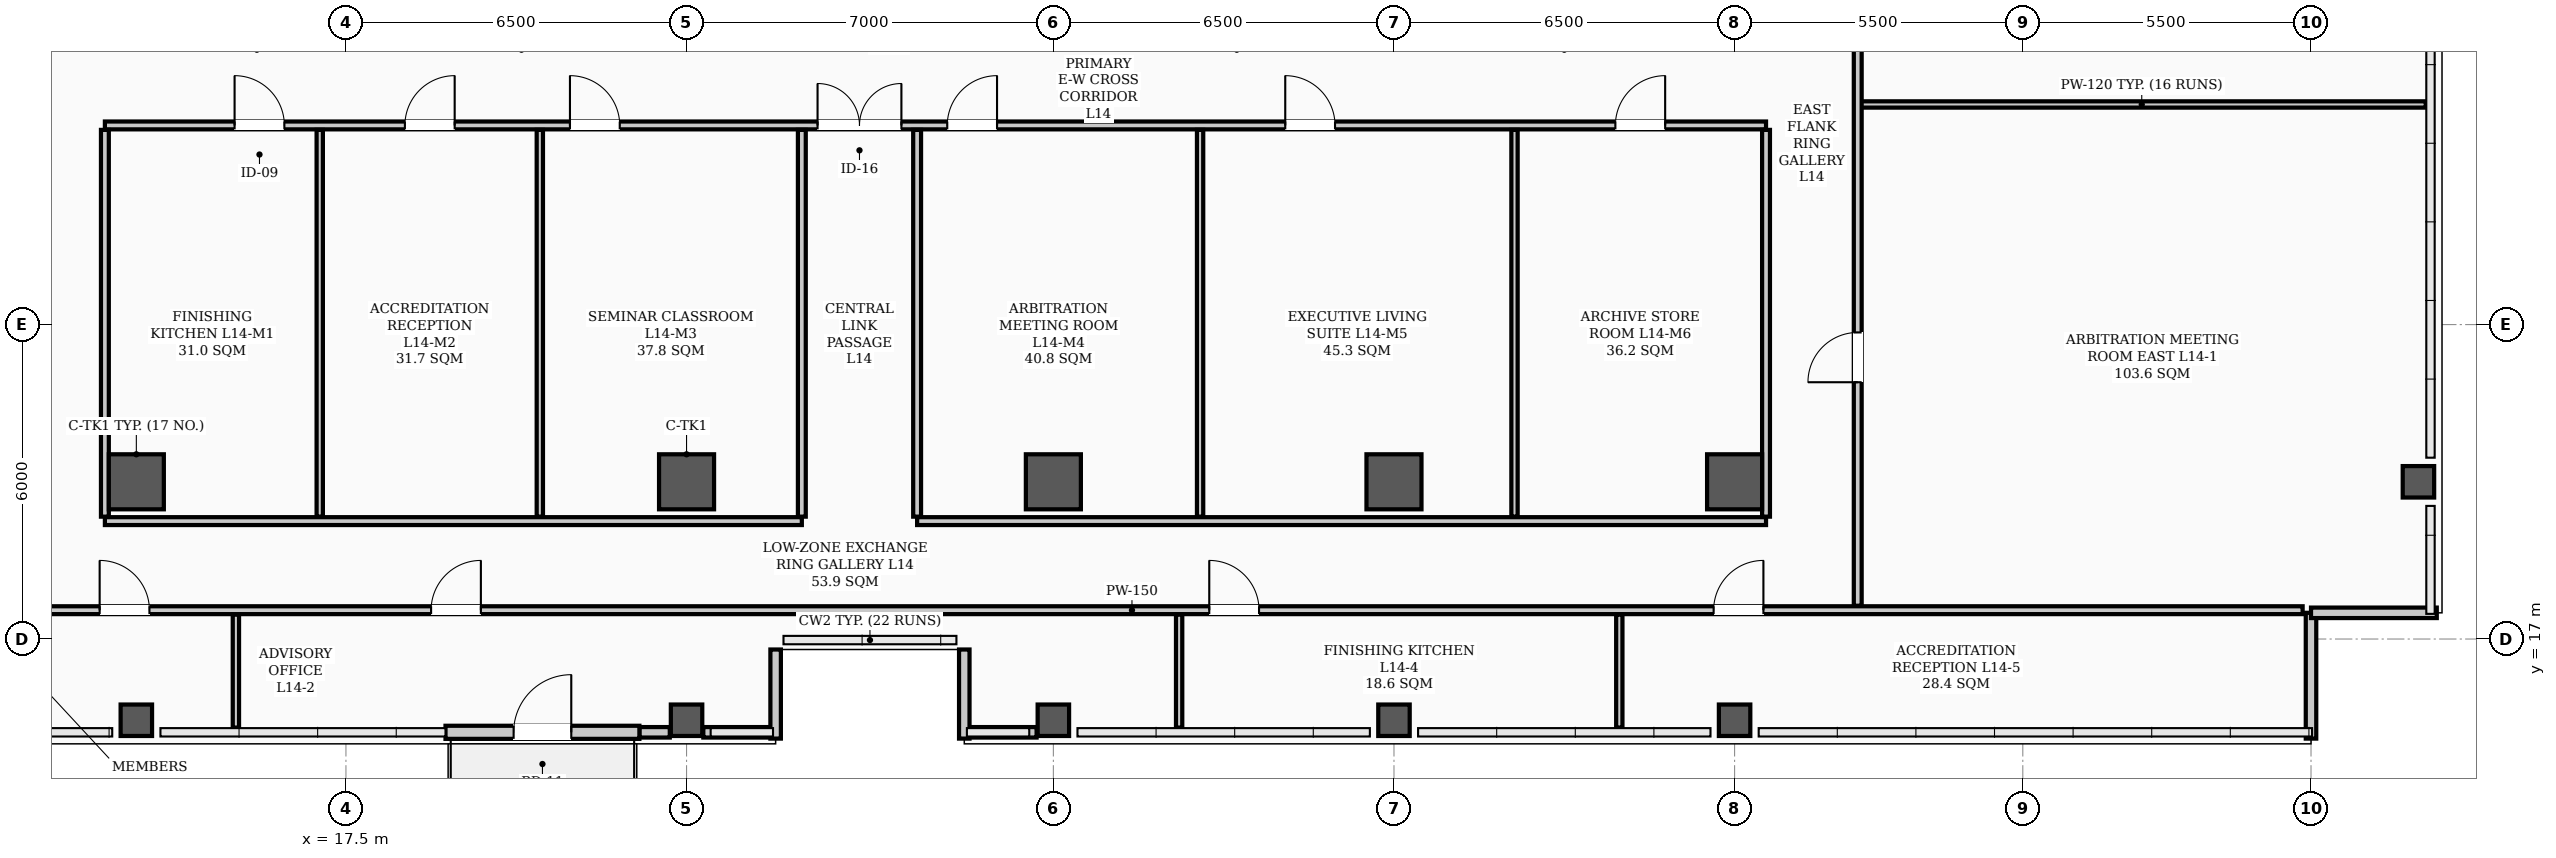
"""IFC4 building model, lengths in metres.
Left out: names, types, materials, properties, quantities, classifications, styles, units other than length and angle.
Written with IfcOpenShell. Run it as: python <this file> out.ifc"""

import sys

from ifc_helpers import new_model, si_unit, direction, frame, frame_2d, origin, origin_2d, place, context, subcontext, project, spatial, rectangle, hollow_rectangle, extrude, element, fill, save


model = new_model("IFC4")
c1 = context("Model", 3, precision=1e-05, world=origin(), true_north=direction((0.0, 1.0)))
c2 = subcontext(c1, "Body", "Model", "MODEL_VIEW")
j1 = project(units=[si_unit("LENGTHUNIT", "METRE"), si_unit("PLANEANGLEUNIT", "RADIAN")], contexts=[c1])
p1 = place(None, origin())
s1 = spatial("IfcSite", under=j1, at=p1, CompositionType="ELEMENT")
p2 = place(p1, origin())
s2 = spatial("IfcBuilding", under=s1, at=p2, CompositionType="ELEMENT")
p3 = place(p2, frame((0.0, 0.0, 57.7)))
s3 = spatial("IfcBuildingStorey", under=s2, at=p3, CompositionType="ELEMENT", Elevation=57.7)
for number, where, z_axis, x_axis in (
    (1, (13.5, 20.0, 0.0), (0.0, 0.0, 1.0), (1.0, 0.0, 0.0)),
    (2, (24.0, 20.0, 0.0), (0.0, 0.0, 1.0), (1.0, 0.0, 0.0)),
    (3, (31.0, 20.0, 0.0), (0.0, 0.0, 1.0), (1.0, 0.0, 0.0)),
    (4, (37.5, 20.0, 0.0), (0.0, 0.0, 1.0), (1.0, 0.0, 0.0)),
    (5, (44.0, 20.0, 0.0), (0.0, 0.0, 1.0), (1.0, 0.0, 0.0)),
):
    element("IfcColumn", number, at=place(p3, frame(where, z_axis=z_axis, x_axis=x_axis)), inside=s3, PredefinedType="COLUMN", context=c2, shape_type="SweptSolid", body=[
        extrude(hollow_rectangle(XDim=1.05, YDim=1.05, WallThickness=0.038, InnerFilletRadius=0.019, OuterFilletRadius=0.057, at=origin_2d()), origin(), (0.0, 0.0, 1.0), 3.9),
    ])
for number, where, z_axis, x_axis in (
    (6, (13.5, 15.45, 0.0), (0.0, 0.0, 1.0), (1.0, 0.0, 0.0)),
    (7, (24.0, 15.45, 0.0), (0.0, 0.0, 1.0), (1.0, 0.0, 0.0)),
    (8, (31.0, 15.45, 0.0), (0.0, 0.0, 1.0), (1.0, 0.0, 0.0)),
    (9, (37.5, 15.45, 0.0), (0.0, 0.0, 1.0), (1.0, 0.0, 0.0)),
    (10, (44.0, 15.45, 0.0), (0.0, 0.0, 1.0), (1.0, 0.0, 0.0)),
    (11, (57.05, 20.0, 0.0), (0.0, 0.0, 1.0), (1.0, 0.0, 0.0)),
):
    element("IfcColumn", number, at=place(p3, frame(where, z_axis=z_axis, x_axis=x_axis)), inside=s3, PredefinedType="COLUMN", context=c2, shape_type="SweptSolid", body=[
        extrude(hollow_rectangle(XDim=0.6, YDim=0.6, WallThickness=0.026, InnerFilletRadius=0.013, OuterFilletRadius=0.039, at=origin_2d()), origin(), (0.0, 0.0, 1.0), 3.9),
    ])
p4 = place(p3, frame((23.1, 15.22, 0.0), z_axis=(0.0, 0.0, 1.0), x_axis=(1.0, 0.0, 0.0)))
e12 = element("IfcWall", 12, at=p4, inside=s3, PredefinedType="PARAPET", context=c2, shape_type="SweptSolid", body=[
    extrude(rectangle(XDim=0.58, YDim=0.2, at=frame_2d((0.29, 0.0))), origin(), (0.0, 0.0, 1.0), 1.2),
])
for number, where, z_axis, x_axis in (
    (13, (24.32, 15.22, 0.0), (0.0, 0.0, 1.0), (1.0, 0.0, 0.0)),
    (14, (29.35, 15.22, 0.0), (0.0, 0.0, 1.0), (1.0, 0.0, 0.0)),
):
    element("IfcWall", number, at=place(p3, frame(where, z_axis=z_axis, x_axis=x_axis)), inside=s3, PredefinedType="PARAPET", context=c2, shape_type="SweptSolid", body=[
        extrude(rectangle(XDim=1.33, YDim=0.2, at=frame_2d((0.665, 0.0))), origin(), (0.0, 0.0, 1.0), 1.2),
    ])
for number, where, z_axis, x_axis in (
    (15, (55.0, 15.1, 0.0), (0.0, 0.0, 1.0), (0.0, 1.0, 0.0)),
    (16, (55.0, 17.5, 0.0), (0.0, 0.0, 1.0), (1.0, 0.0, 0.0)),
):
    element("IfcWall", number, at=place(p3, frame(where, z_axis=z_axis, x_axis=x_axis)), inside=s3, PredefinedType="PARAPET", context=c2, shape_type="SweptSolid", body=[
        extrude(rectangle(XDim=2.4, YDim=0.2, at=frame_2d((1.2, 0.0))), origin(), (0.0, 0.0, 1.0), 1.2),
    ])
for number, where, z_axis, x_axis in (
    (17, (25.7, 15.1, 0.0), (0.0, 0.0, 1.0), (0.0, 1.0, 0.0)),
    (18, (29.3, 16.8, 0.0), (0.0, 0.0, 1.0), (0.0, -1.0, 0.0)),
):
    element("IfcWall", number, at=place(p3, frame(where, z_axis=z_axis, x_axis=x_axis)), inside=s3, PredefinedType="PARAPET", context=c2, shape_type="SweptSolid", body=[
        extrude(rectangle(XDim=1.7, YDim=0.2, at=frame_2d((0.85, 0.0))), origin(), (0.0, 0.0, 1.0), 1.2),
    ])
p5 = place(p3, frame((19.4, 15.22, 0.0), z_axis=(0.0, 0.0, 1.0), x_axis=(1.0, 0.0, 0.0)))
e19 = element("IfcWall", 19, at=p5, inside=s3, PredefinedType="STANDARD", context=c2, shape_type="SweptSolid", body=[
    extrude(rectangle(XDim=3.7, YDim=0.25, at=frame_2d((1.85, 0.0))), origin(), (0.0, 0.0, 1.0), 3.18),
])
p6 = place(p5, frame((1.3, 0.0, 0.0)))
e20 = element("IfcOpeningElement", 20, at=p6, cuts=e19, PredefinedType="OPENING", context=c2, shape_type="SweptSolid", body=[
    extrude(rectangle(XDim=1.1, YDim=2.2, at=frame_2d((0.55, 1.1))), frame((0.0, 0.135, 0.0), z_axis=(0.0, -1.0, 0.0), x_axis=(1.0, 0.0, 0.0)), (0.0, 0.0, 1.0), 0.27),
])
p7 = place(p3, frame((12.9, 26.8, 0.0), z_axis=(0.0, 0.0, 1.0), x_axis=(1.0, 0.0, 0.0)))
e21 = element("IfcWall", 21, at=p7, inside=s3, PredefinedType="PARTITIONING", context=c2, shape_type="SweptSolid", body=[
    extrude(rectangle(XDim=31.7, YDim=0.15, at=frame_2d((15.85, 0.0))), origin(), (0.0, 0.0, 1.0), 3.1),
])
p8 = place(p7, frame((13.6, 0.0, 0.0)))
e22 = element("IfcOpeningElement", 22, at=p8, cuts=e21, PredefinedType="OPENING", context=c2, shape_type="SweptSolid", body=[
    extrude(rectangle(XDim=1.6, YDim=2.08, at=frame_2d((0.8, 1.04))), frame((0.0, 0.085, 0.0), z_axis=(0.0, -1.0, 0.0), x_axis=(1.0, 0.0, 0.0)), (0.0, 0.0, 1.0), 0.17),
])
p9 = place(p7, frame((2.475, 0.0, 0.0)))
e23 = element("IfcOpeningElement", 23, at=p9, cuts=e21, PredefinedType="OPENING", context=c2, shape_type="SweptSolid", body=[
    extrude(rectangle(XDim=0.95, YDim=2.08, at=frame_2d((0.475, 1.04))), frame((0.0, 0.085, 0.0), z_axis=(0.0, -1.0, 0.0), x_axis=(1.0, 0.0, 0.0)), (0.0, 0.0, 1.0), 0.17),
])
p10 = place(p7, frame((5.725, 0.0, 0.0)))
e24 = element("IfcOpeningElement", 24, at=p10, cuts=e21, PredefinedType="OPENING", context=c2, shape_type="SweptSolid", body=[
    extrude(rectangle(XDim=0.95, YDim=2.08, at=frame_2d((0.475, 1.04))), frame((0.0, 0.085, 0.0), z_axis=(0.0, -1.0, 0.0), x_axis=(1.0, 0.0, 0.0)), (0.0, 0.0, 1.0), 0.17),
])
p11 = place(p7, frame((8.875, 0.0, 0.0)))
e25 = element("IfcOpeningElement", 25, at=p11, cuts=e21, PredefinedType="OPENING", context=c2, shape_type="SweptSolid", body=[
    extrude(rectangle(XDim=0.95, YDim=2.08, at=frame_2d((0.475, 1.04))), frame((0.0, 0.085, 0.0), z_axis=(0.0, -1.0, 0.0), x_axis=(1.0, 0.0, 0.0)), (0.0, 0.0, 1.0), 0.17),
])
p12 = place(p7, frame((16.075, 0.0, 0.0)))
e26 = element("IfcOpeningElement", 26, at=p12, cuts=e21, PredefinedType="OPENING", context=c2, shape_type="SweptSolid", body=[
    extrude(rectangle(XDim=0.95, YDim=2.08, at=frame_2d((0.475, 1.04))), frame((0.0, 0.085, 0.0), z_axis=(0.0, -1.0, 0.0), x_axis=(1.0, 0.0, 0.0)), (0.0, 0.0, 1.0), 0.17),
])
p13 = place(p7, frame((22.525, 0.0, 0.0)))
e27 = element("IfcOpeningElement", 27, at=p13, cuts=e21, PredefinedType="OPENING", context=c2, shape_type="SweptSolid", body=[
    extrude(rectangle(XDim=0.95, YDim=2.08, at=frame_2d((0.475, 1.04))), frame((0.0, 0.085, 0.0), z_axis=(0.0, -1.0, 0.0), x_axis=(1.0, 0.0, 0.0)), (0.0, 0.0, 1.0), 0.17),
])
p14 = place(p7, frame((28.825, 0.0, 0.0)))
e28 = element("IfcOpeningElement", 28, at=p14, cuts=e21, PredefinedType="OPENING", context=c2, shape_type="SweptSolid", body=[
    extrude(rectangle(XDim=0.95, YDim=2.08, at=frame_2d((0.475, 1.04))), frame((0.0, 0.085, 0.0), z_axis=(0.0, -1.0, 0.0), x_axis=(1.0, 0.0, 0.0)), (0.0, 0.0, 1.0), 0.17),
])
p15 = place(p3, frame((10.16, 17.55, 0.0), z_axis=(0.0, 0.0, 1.0), x_axis=(1.0, 0.0, 0.0)))
e29 = element("IfcWall", 29, at=p15, inside=s3, PredefinedType="PARTITIONING", context=c2, shape_type="SweptSolid", body=[
    extrude(rectangle(XDim=44.68, YDim=0.15, at=frame_2d((22.34, 0.0))), origin(), (0.0, 0.0, 1.0), 3.1),
])
p16 = place(p15, frame((2.64, 0.0, 0.0)))
e30 = element("IfcOpeningElement", 30, at=p16, cuts=e29, PredefinedType="OPENING", context=c2, shape_type="SweptSolid", body=[
    extrude(rectangle(XDim=0.95, YDim=2.08, at=frame_2d((0.475, 1.04))), frame((0.0, 0.085, 0.0), z_axis=(0.0, -1.0, 0.0), x_axis=(1.0, 0.0, 0.0)), (0.0, 0.0, 1.0), 0.17),
])
p17 = place(p15, frame((8.965, 0.0, 0.0)))
e31 = element("IfcOpeningElement", 31, at=p17, cuts=e29, PredefinedType="OPENING", context=c2, shape_type="SweptSolid", body=[
    extrude(rectangle(XDim=0.95, YDim=2.08, at=frame_2d((0.475, 1.04))), frame((0.0, 0.085, 0.0), z_axis=(0.0, -1.0, 0.0), x_axis=(1.0, 0.0, 0.0)), (0.0, 0.0, 1.0), 0.17),
])
p18 = place(p15, frame((23.815, 0.0, 0.0)))
e32 = element("IfcOpeningElement", 32, at=p18, cuts=e29, PredefinedType="OPENING", context=c2, shape_type="SweptSolid", body=[
    extrude(rectangle(XDim=0.95, YDim=2.08, at=frame_2d((0.475, 1.04))), frame((0.0, 0.085, 0.0), z_axis=(0.0, -1.0, 0.0), x_axis=(1.0, 0.0, 0.0)), (0.0, 0.0, 1.0), 0.17),
])
p19 = place(p15, frame((33.44, 0.0, 0.0)))
e33 = element("IfcOpeningElement", 33, at=p19, cuts=e29, PredefinedType="OPENING", context=c2, shape_type="SweptSolid", body=[
    extrude(rectangle(XDim=0.95, YDim=2.08, at=frame_2d((0.475, 1.04))), frame((0.0, 0.085, 0.0), z_axis=(0.0, -1.0, 0.0), x_axis=(1.0, 0.0, 0.0)), (0.0, 0.0, 1.0), 0.17),
])
p20 = place(p3, frame((12.9, 19.25, 0.0), z_axis=(0.0, 0.0, 1.0), x_axis=(1.0, 0.0, 0.0)))
e34 = element("IfcWall", 34, at=p20, inside=s3, PredefinedType="PARTITIONING", context=c2, shape_type="SweptSolid", body=[
    extrude(rectangle(XDim=13.3, YDim=0.15, at=frame_2d((6.65, 0.0))), origin(), (0.0, 0.0, 1.0), 3.1),
])
p21 = place(p3, frame((28.4, 19.25, 0.0), z_axis=(0.0, 0.0, 1.0), x_axis=(1.0, 0.0, 0.0)))
e35 = element("IfcWall", 35, at=p21, inside=s3, PredefinedType="PARTITIONING", context=c2, shape_type="SweptSolid", body=[
    extrude(rectangle(XDim=16.2, YDim=0.15, at=frame_2d((8.1, 0.0))), origin(), (0.0, 0.0, 1.0), 3.1),
])
p22 = place(p3, frame((46.35, 27.2, 0.0), z_axis=(0.0, 0.0, 1.0), x_axis=(1.0, 0.0, 0.0)))
e36 = element("IfcWall", 36, at=p22, inside=s3, PredefinedType="PARTITIONING", context=c2, shape_type="SweptSolid", body=[
    extrude(rectangle(XDim=10.84, YDim=0.12, at=frame_2d((5.42, 0.0))), origin(), (0.0, 0.0, 1.0), 3.212),
])
for number, where, z_axis, x_axis in (
    (37, (26.2, 19.335, 0.0), (0.0, 0.0, 1.0), (0.0, 1.0, 0.0)),
    (38, (28.4, 19.335, 0.0), (0.0, 0.0, 1.0), (0.0, 1.0, 0.0)),
    (39, (12.9, 19.335, 0.0), (0.0, 0.0, 1.0), (0.0, 1.0, 0.0)),
):
    element("IfcWall", number, at=place(p3, frame(where, z_axis=z_axis, x_axis=x_axis)), inside=s3, PredefinedType="PARTITIONING", context=c2, shape_type="SweptSolid", body=[
        extrude(rectangle(XDim=7.38, YDim=0.15, at=frame_2d((3.69, 0.0))), origin(), (0.0, 0.0, 1.0), 3.0),
    ])
p23 = place(p3, frame((46.35, 17.635, 0.0), z_axis=(0.0, 0.0, 1.0), x_axis=(0.0, 1.0, 0.0)))
e40 = element("IfcWall", 40, at=p23, inside=s3, PredefinedType="PARTITIONING", context=c2, shape_type="SweptSolid", body=[
    extrude(rectangle(XDim=22.53, YDim=0.15, at=frame_2d((11.265, 0.0))), origin(), (0.0, 0.0, 1.0), 3.0),
])
p24 = place(p23, frame((4.265, 0.0, 0.0)))
e41 = element("IfcOpeningElement", 41, at=p24, cuts=e40, PredefinedType="OPENING", context=c2, shape_type="SweptSolid", body=[
    extrude(rectangle(XDim=0.95, YDim=2.08, at=frame_2d((0.475, 1.04))), frame((0.0, 0.085, 0.0), z_axis=(0.0, -1.0, 0.0), x_axis=(1.0, 0.0, 0.0)), (0.0, 0.0, 1.0), 0.17),
])
p25 = place(p23, frame((12.39, 0.0, 0.0)))
e42 = element("IfcOpeningElement", 42, at=p25, cuts=e40, PredefinedType="OPENING", context=c2, shape_type="SweptSolid", body=[
    extrude(rectangle(XDim=0.95, YDim=2.08, at=frame_2d((0.475, 1.04))), frame((0.0, 0.085, 0.0), z_axis=(0.0, -1.0, 0.0), x_axis=(1.0, 0.0, 0.0)), (0.0, 0.0, 1.0), 0.17),
])
p26 = place(p23, frame((18.915, 0.0, 0.0)))
e43 = element("IfcOpeningElement", 43, at=p26, cuts=e40, PredefinedType="OPENING", context=c2, shape_type="SweptSolid", body=[
    extrude(rectangle(XDim=0.95, YDim=2.08, at=frame_2d((0.475, 1.04))), frame((0.0, 0.085, 0.0), z_axis=(0.0, -1.0, 0.0), x_axis=(1.0, 0.0, 0.0)), (0.0, 0.0, 1.0), 0.17),
])
p27 = place(p3, frame((44.6, 19.335, 0.0), z_axis=(0.0, 0.0, 1.0), x_axis=(0.0, 1.0, 0.0)))
e44 = element("IfcWall", 44, at=p27, inside=s3, PredefinedType="PARTITIONING", context=c2, shape_type="SweptSolid", body=[
    extrude(rectangle(XDim=7.38, YDim=0.15, at=frame_2d((3.69, 0.0))), origin(), (0.0, 0.0, 1.0), 3.0),
])
for number, where, z_axis, x_axis in (
    (45, (15.4, 15.31, 0.0), (0.0, 0.0, 1.0), (0.0, 1.0, 0.0)),
    (46, (33.4, 15.31, 0.0), (0.0, 0.0, 1.0), (0.0, 1.0, 0.0)),
    (47, (41.8, 15.31, 0.0), (0.0, 0.0, 1.0), (0.0, 1.0, 0.0)),
):
    element("IfcWall", number, at=place(p3, frame(where, z_axis=z_axis, x_axis=x_axis)), inside=s3, PredefinedType="PARTITIONING", context=c2, shape_type="SweptSolid", body=[
        extrude(rectangle(XDim=2.155, YDim=0.12, at=frame_2d((1.078, 0.0))), origin(), (0.0, 0.0, 1.0), 3.212),
    ])
for number, where, z_axis, x_axis in (
    (48, (17.0, 19.335, 0.0), (0.0, 0.0, 1.0), (0.0, 1.0, 0.0)),
    (49, (21.2, 19.335, 0.0), (0.0, 0.0, 1.0), (0.0, 1.0, 0.0)),
    (50, (33.8, 19.335, 0.0), (0.0, 0.0, 1.0), (0.0, 1.0, 0.0)),
    (51, (39.8, 19.335, 0.0), (0.0, 0.0, 1.0), (0.0, 1.0, 0.0)),
):
    element("IfcWall", number, at=place(p3, frame(where, z_axis=z_axis, x_axis=x_axis)), inside=s3, PredefinedType="PARTITIONING", context=c2, shape_type="SweptSolid", body=[
        extrude(rectangle(XDim=7.38, YDim=0.12, at=frame_2d((3.69, 0.0))), origin(), (0.0, 0.0, 1.0), 3.0),
    ])
p28 = place(p6, origin())
e52 = element("IfcDoor", 52, at=p28, inside=s3, OperationType="SINGLE_SWING_RIGHT", PredefinedType="DOOR", context=c2, shape_type="SweptSolid", body=[
    extrude(rectangle(XDim=1.1, YDim=2.2, at=frame_2d((0.55, 1.1))), frame((0.0, 0.025, 0.0), z_axis=(0.0, -1.0, 0.0), x_axis=(1.0, 0.0, 0.0)), (0.0, 0.0, 1.0), 0.05),
])
fill(e20, e52)
p29 = place(p8, origin())
e53 = element("IfcDoor", 53, at=p29, inside=s3, OperationType="DOUBLE_DOOR_SINGLE_SWING", PredefinedType="DOOR", context=c2, shape_type="SweptSolid", body=[
    extrude(rectangle(XDim=1.6, YDim=2.08, at=frame_2d((0.8, 1.04))), frame((0.0, 0.025, 0.0), z_axis=(0.0, -1.0, 0.0), x_axis=(1.0, 0.0, 0.0)), (0.0, 0.0, 1.0), 0.05),
])
fill(e22, e53)
p30 = place(p16, origin())
e54 = element("IfcDoor", 54, at=p30, inside=s3, OperationType="SINGLE_SWING_LEFT", PredefinedType="DOOR", context=c2, shape_type="SweptSolid", body=[
    extrude(rectangle(XDim=0.95, YDim=2.08, at=frame_2d((0.475, 1.04))), frame((0.0, 0.025, 0.0), z_axis=(0.0, -1.0, 0.0), x_axis=(1.0, 0.0, 0.0)), (0.0, 0.0, 1.0), 0.05),
])
fill(e30, e54)
p31 = place(p17, origin())
e55 = element("IfcDoor", 55, at=p31, inside=s3, OperationType="SINGLE_SWING_RIGHT", PredefinedType="DOOR", context=c2, shape_type="SweptSolid", body=[
    extrude(rectangle(XDim=0.95, YDim=2.08, at=frame_2d((0.475, 1.04))), frame((0.0, 0.025, 0.0), z_axis=(0.0, -1.0, 0.0), x_axis=(1.0, 0.0, 0.0)), (0.0, 0.0, 1.0), 0.05),
])
fill(e31, e55)
p32 = place(p18, origin())
e56 = element("IfcDoor", 56, at=p32, inside=s3, OperationType="SINGLE_SWING_LEFT", PredefinedType="DOOR", context=c2, shape_type="SweptSolid", body=[
    extrude(rectangle(XDim=0.95, YDim=2.08, at=frame_2d((0.475, 1.04))), frame((0.0, 0.025, 0.0), z_axis=(0.0, -1.0, 0.0), x_axis=(1.0, 0.0, 0.0)), (0.0, 0.0, 1.0), 0.05),
])
fill(e32, e56)
p33 = place(p19, origin())
e57 = element("IfcDoor", 57, at=p33, inside=s3, OperationType="SINGLE_SWING_RIGHT", PredefinedType="DOOR", context=c2, shape_type="SweptSolid", body=[
    extrude(rectangle(XDim=0.95, YDim=2.08, at=frame_2d((0.475, 1.04))), frame((0.0, 0.025, 0.0), z_axis=(0.0, -1.0, 0.0), x_axis=(1.0, 0.0, 0.0)), (0.0, 0.0, 1.0), 0.05),
])
fill(e33, e57)
p34 = place(p9, origin())
e58 = element("IfcDoor", 58, at=p34, inside=s3, OperationType="SINGLE_SWING_LEFT", PredefinedType="DOOR", context=c2, shape_type="SweptSolid", body=[
    extrude(rectangle(XDim=0.95, YDim=2.08, at=frame_2d((0.475, 1.04))), frame((0.0, 0.025, 0.0), z_axis=(0.0, -1.0, 0.0), x_axis=(1.0, 0.0, 0.0)), (0.0, 0.0, 1.0), 0.05),
])
fill(e23, e58)
p35 = place(p10, origin())
e59 = element("IfcDoor", 59, at=p35, inside=s3, OperationType="SINGLE_SWING_RIGHT", PredefinedType="DOOR", context=c2, shape_type="SweptSolid", body=[
    extrude(rectangle(XDim=0.95, YDim=2.08, at=frame_2d((0.475, 1.04))), frame((0.0, 0.025, 0.0), z_axis=(0.0, -1.0, 0.0), x_axis=(1.0, 0.0, 0.0)), (0.0, 0.0, 1.0), 0.05),
])
fill(e24, e59)
p36 = place(p11, origin())
e60 = element("IfcDoor", 60, at=p36, inside=s3, OperationType="SINGLE_SWING_LEFT", PredefinedType="DOOR", context=c2, shape_type="SweptSolid", body=[
    extrude(rectangle(XDim=0.95, YDim=2.08, at=frame_2d((0.475, 1.04))), frame((0.0, 0.025, 0.0), z_axis=(0.0, -1.0, 0.0), x_axis=(1.0, 0.0, 0.0)), (0.0, 0.0, 1.0), 0.05),
])
fill(e25, e60)
p37 = place(p12, origin())
e61 = element("IfcDoor", 61, at=p37, inside=s3, OperationType="SINGLE_SWING_RIGHT", PredefinedType="DOOR", context=c2, shape_type="SweptSolid", body=[
    extrude(rectangle(XDim=0.95, YDim=2.08, at=frame_2d((0.475, 1.04))), frame((0.0, 0.025, 0.0), z_axis=(0.0, -1.0, 0.0), x_axis=(1.0, 0.0, 0.0)), (0.0, 0.0, 1.0), 0.05),
])
fill(e26, e61)
p38 = place(p13, origin())
e62 = element("IfcDoor", 62, at=p38, inside=s3, OperationType="SINGLE_SWING_LEFT", PredefinedType="DOOR", context=c2, shape_type="SweptSolid", body=[
    extrude(rectangle(XDim=0.95, YDim=2.08, at=frame_2d((0.475, 1.04))), frame((0.0, 0.025, 0.0), z_axis=(0.0, -1.0, 0.0), x_axis=(1.0, 0.0, 0.0)), (0.0, 0.0, 1.0), 0.05),
])
fill(e27, e62)
p39 = place(p14, origin())
e63 = element("IfcDoor", 63, at=p39, inside=s3, OperationType="SINGLE_SWING_RIGHT", PredefinedType="DOOR", context=c2, shape_type="SweptSolid", body=[
    extrude(rectangle(XDim=0.95, YDim=2.08, at=frame_2d((0.475, 1.04))), frame((0.0, 0.025, 0.0), z_axis=(0.0, -1.0, 0.0), x_axis=(1.0, 0.0, 0.0)), (0.0, 0.0, 1.0), 0.05),
])
fill(e28, e63)
p40 = place(p24, origin())
e64 = element("IfcDoor", 64, at=p40, inside=s3, OperationType="SINGLE_SWING_LEFT", PredefinedType="DOOR", context=c2, shape_type="SweptSolid", body=[
    extrude(rectangle(XDim=0.95, YDim=2.08, at=frame_2d((0.475, 1.04))), frame((0.0, 0.025, 0.0), z_axis=(0.0, -1.0, 0.0), x_axis=(1.0, 0.0, 0.0)), (0.0, 0.0, 1.0), 0.05),
])
fill(e41, e64)
save(model, sys.argv[1])
